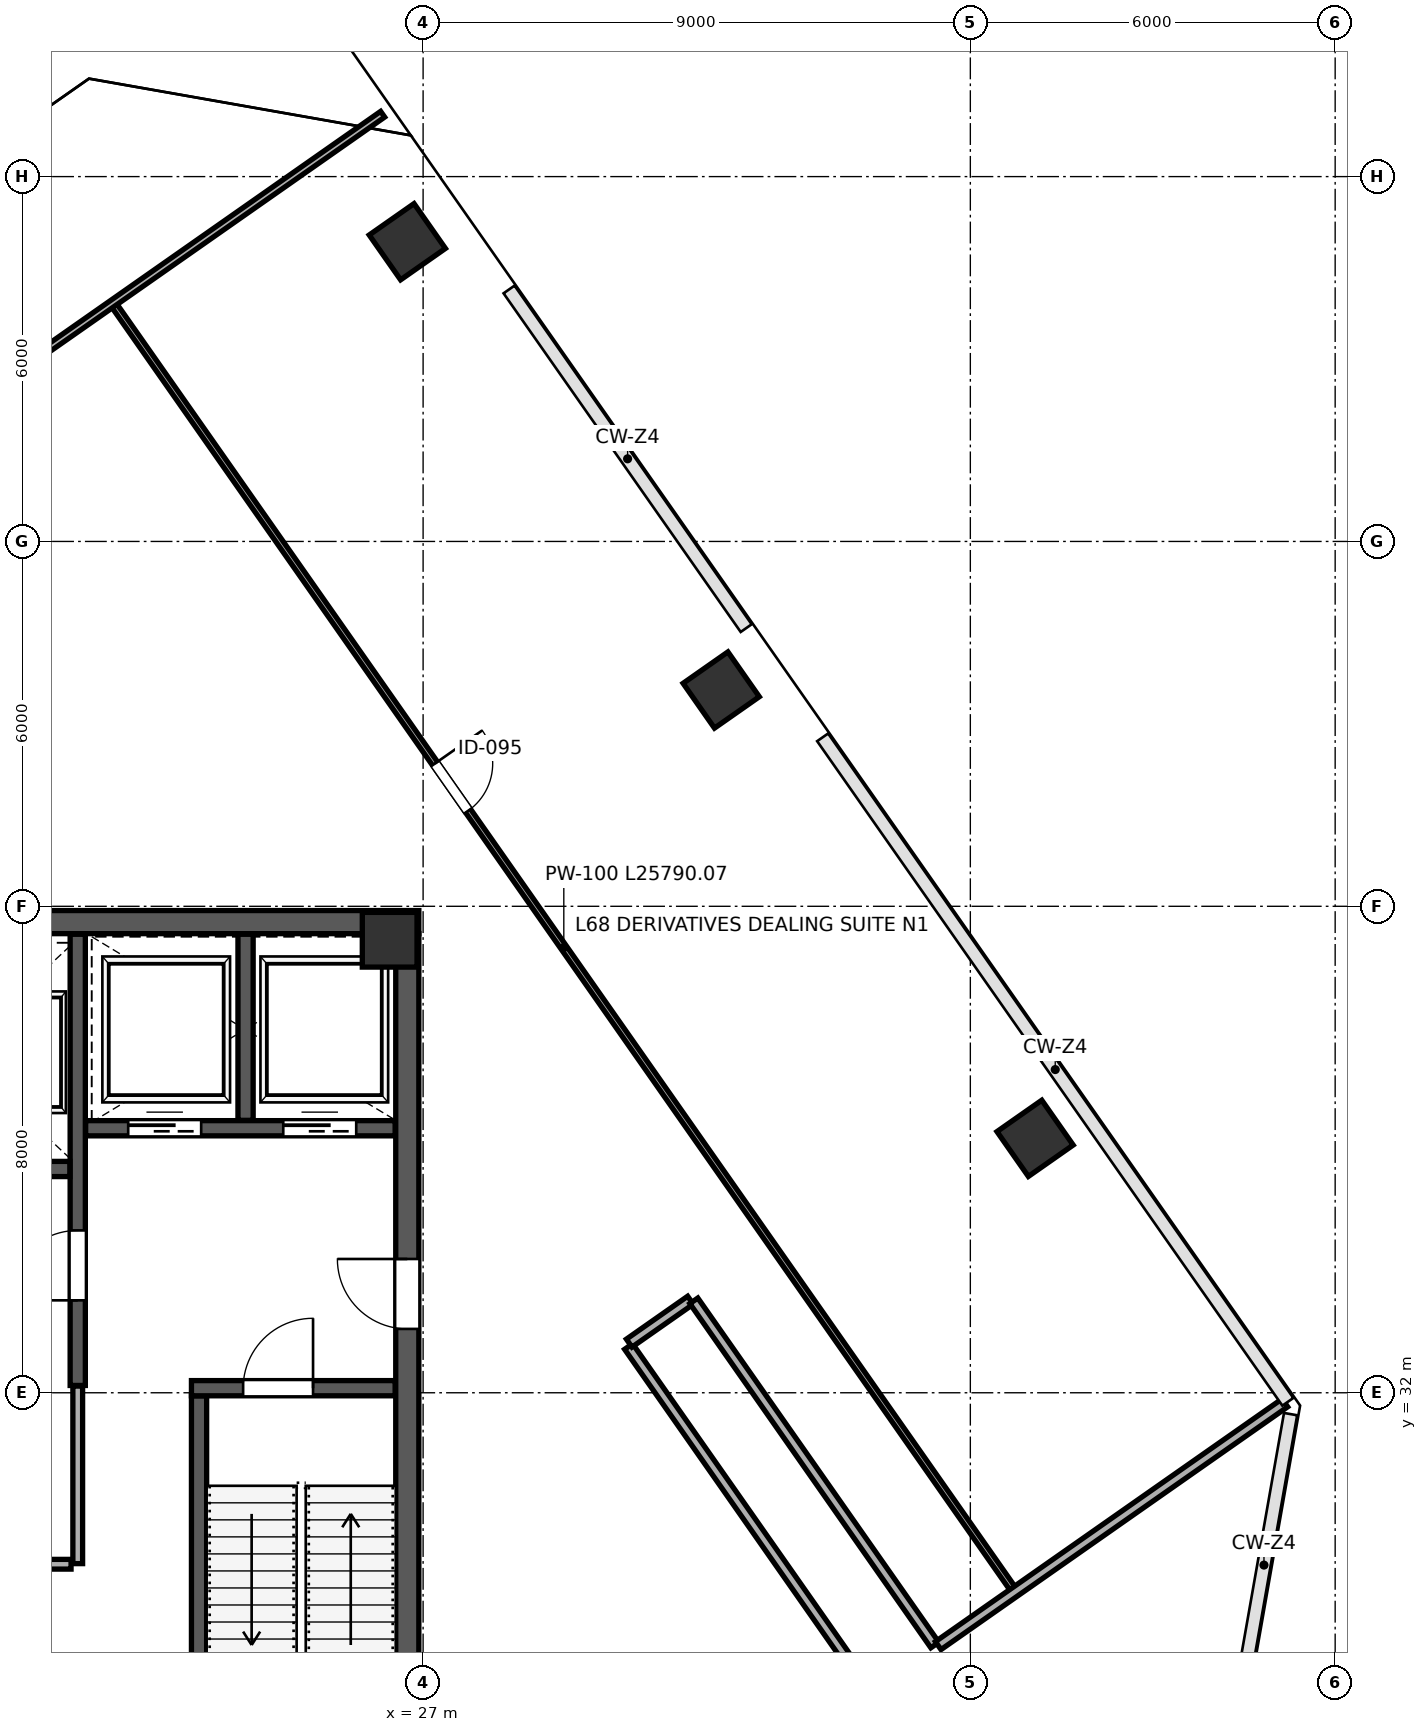
"""IFC4 building model, lengths in metres.
Left out: names, types, materials, properties, quantities, classifications, styles, units other than length and angle.
Written with IfcOpenShell. Run it as: python <this file> out.ifc"""

import sys

from ifc_helpers import new_model, si_unit, direction, frame, frame_2d, origin, origin_2d, place, context, subcontext, project, spatial, rectangle, extrude, clip, halfspace, source, transform, mapped, element, fill, save


model = new_model("IFC4")
c1 = context("Model", 3, precision=1e-05, world=origin(), true_north=direction((0.0, 1.0)))
c2 = subcontext(c1, "Body", "Model", "MODEL_VIEW")
j1 = project(units=[si_unit("LENGTHUNIT", "METRE"), si_unit("PLANEANGLEUNIT", "RADIAN")], contexts=[c1])
p1 = place(None, origin())
s1 = spatial("IfcSite", under=j1, at=p1, CompositionType="ELEMENT")
p2 = place(p1, origin())
s2 = spatial("IfcBuilding", under=s1, at=p2, CompositionType="ELEMENT")
p3 = place(p2, frame((0.0, 0.0, 303.0)))
s3 = spatial("IfcBuildingStorey", under=s2, at=p3, CompositionType="ELEMENT", Elevation=303.0)
m1 = source(origin(), c2, "Body", "SweptSolid", [
    extrude(rectangle(XDim=0.9, YDim=0.9, at=origin_2d()), origin(), (0.0, 0.0, 1.0), 4.198),
])
p4 = place(p3, frame((26.45, 39.45, 0.001), z_axis=(0.0, 0.0, 1.0), x_axis=(1.0, 0.0, 0.0)))
e1 = element("IfcColumn", 1, at=p4, inside=s3, PredefinedType="COLUMN", context=c2, shape_type="MappedRepresentation", body=[
    mapped(m1, transform((0.0, 0.0, 0.0), scale=1.0)),
])
p5 = place(p3, frame((26.74, 50.929, 0.0), z_axis=(0.191430082307, -0.057525850381, 0.979819013964), x_axis=(-0.933735019566, -0.318322018104, 0.163737613351)))
e2 = element("IfcColumn", 2, at=p5, inside=s3, PredefinedType="COLUMN", context=c2, shape_type="Clipping", body=[
    clip(clip(extrude(rectangle(XDim=0.9, YDim=0.9, at=origin_2d()), origin(), (0.0, 0.0, 1.0), 4.286), halfspace(frame((0.0, 0.0, 0.129), z_axis=(0.0, 0.0, -1.0), x_axis=(1.0, 0.0, 0.0)), False)), halfspace(frame((0.0, 0.0, 4.158), z_axis=(0.0, 0.0, 1.0), x_axis=(1.0, 0.0, 0.0)), False)),
])
p6 = place(p3, frame((31.903, 43.557, 0.0), z_axis=(0.116149103088, -0.109205406707, 0.987209990325), x_axis=(-0.982055587014, 0.136059325821, 0.130593582814)))
e3 = element("IfcColumn", 3, at=p6, inside=s3, PredefinedType="COLUMN", context=c2, shape_type="Clipping", body=[
    clip(clip(extrude(rectangle(XDim=0.9, YDim=0.9, at=origin_2d()), origin(), (0.0, 0.0, 1.0), 4.254), halfspace(frame((0.0, 0.0, 0.102), z_axis=(0.0, 0.0, -1.0), x_axis=(1.0, 0.0, 0.0)), False)), halfspace(frame((0.0, 0.0, 4.152), z_axis=(0.0, 0.0, 1.0), x_axis=(1.0, 0.0, 0.0)), False)),
])
p7 = place(p3, frame((37.065, 36.184, 0.0), z_axis=(0.039386712423, -0.160356091191, 0.986273091442), x_axis=(-0.749730751195, 0.647771912034, 0.135260307157)))
e4 = element("IfcColumn", 4, at=p7, inside=s3, PredefinedType="COLUMN", context=c2, shape_type="Clipping", body=[
    clip(clip(extrude(rectangle(XDim=0.9, YDim=0.9, at=origin_2d()), origin(), (0.0, 0.0, 1.0), 4.258), halfspace(frame((0.0, 0.0, 0.106), z_axis=(0.0, 0.0, -1.0), x_axis=(1.0, 0.0, 0.0)), False)), halfspace(frame((0.0, 0.0, 4.153), z_axis=(0.0, 0.0, 1.0), x_axis=(1.0, 0.0, 0.0)), False)),
])
p8 = place(p3, frame((26.74, 24.45, 0.0), z_axis=(0.0, 0.0, 1.0), x_axis=(0.0, 1.0, 0.0)))
e5 = element("IfcWall", 5, at=p8, inside=s3, PredefinedType="SHEAR", context=c2, shape_type="SweptSolid", body=[
    extrude(rectangle(XDim=15.1, YDim=0.38, at=frame_2d((7.55, 0.0))), origin(), (0.0, 0.0, 1.0), 3.96),
])
p9 = place(p8, frame((8.6, 0.0, 0.0)))
e6 = element("IfcOpeningElement", 6, at=p9, cuts=e5, PredefinedType="OPENING", context=c2, shape_type="SweptSolid", body=[
    extrude(rectangle(XDim=1.15, YDim=2.2, at=frame_2d((0.575, 1.1))), frame((0.0, 0.2, 0.0), z_axis=(0.0, -1.0, 0.0), x_axis=(1.0, 0.0, 0.0)), (0.0, 0.0, 1.0), 0.4),
])
p10 = place(p3, frame((9.07, 39.74, 0.0), z_axis=(0.0, 0.0, 1.0), x_axis=(1.0, 0.0, 0.0)))
e7 = element("IfcWall", 7, at=p10, inside=s3, PredefinedType="SHEAR", context=c2, shape_type="SweptSolid", body=[
    extrude(rectangle(XDim=17.86, YDim=0.38, at=frame_2d((8.93, 0.0))), origin(), (0.0, 0.0, 1.0), 3.96),
])
p11 = place(p3, frame((23.315, 24.46, 0.0), z_axis=(0.0, 0.0, 1.0), x_axis=(0.0, 1.0, 0.0)))
e8 = element("IfcWall", 8, at=p11, inside=s3, PredefinedType="SHEAR", context=c2, shape_type="SweptSolid", body=[
    extrude(rectangle(XDim=7.49, YDim=0.25, at=frame_2d((3.745, 0.0))), origin(), (0.0, 0.0, 1.0), 3.96),
])
p12 = place(p3, frame((23.19, 32.075, 0.0), z_axis=(0.0, 0.0, 1.0), x_axis=(1.0, 0.0, 0.0)))
e9 = element("IfcWall", 9, at=p12, inside=s3, PredefinedType="SHEAR", context=c2, shape_type="SweptSolid", body=[
    extrude(rectangle(XDim=3.35, YDim=0.25, at=frame_2d((1.675, 0.0))), origin(), (0.0, 0.0, 1.0), 3.96),
])
p13 = place(p12, frame((0.85, 0.0, 0.0)))
e10 = element("IfcOpeningElement", 10, at=p13, cuts=e9, PredefinedType="OPENING", context=c2, shape_type="SweptSolid", body=[
    extrude(rectangle(XDim=1.15, YDim=2.2, at=frame_2d((0.575, 1.1))), frame((0.0, 0.135, 0.0), z_axis=(0.0, -1.0, 0.0), x_axis=(1.0, 0.0, 0.0)), (0.0, 0.0, 1.0), 0.27),
])
p14 = place(p3, frame((21.32, 32.12, 0.0), z_axis=(0.0, 0.0, 1.0), x_axis=(0.0, 1.0, 0.0)))
e11 = element("IfcWall", 11, at=p14, inside=s3, PredefinedType="SHEAR", context=c2, shape_type="SweptSolid", body=[
    extrude(rectangle(XDim=7.42, YDim=0.25, at=frame_2d((3.71, 0.0))), origin(), (0.0, 0.0, 1.0), 3.96),
])
p15 = place(p14, frame((1.4, 0.0, 0.0)))
e12 = element("IfcOpeningElement", 12, at=p15, cuts=e11, PredefinedType="OPENING", context=c2, shape_type="SweptSolid", body=[
    extrude(rectangle(XDim=1.15, YDim=2.2, at=frame_2d((0.575, 1.1))), frame((0.0, 0.135, 0.0), z_axis=(0.0, -1.0, 0.0), x_axis=(1.0, 0.0, 0.0)), (0.0, 0.0, 1.0), 0.27),
])
p16 = place(p3, frame((21.45, 36.35, 0.0), z_axis=(0.0, 0.0, 1.0), x_axis=(1.0, 0.0, 0.0)))
e13 = element("IfcWall", 13, at=p16, inside=s3, PredefinedType="SHEAR", context=c2, shape_type="SweptSolid", body=[
    extrude(rectangle(XDim=5.09, YDim=0.25, at=frame_2d((2.545, 0.0))), origin(), (0.0, 0.0, 1.0), 3.96),
])
p17 = place(p16, frame((0.7, 0.0, 0.0)))
e14 = element("IfcOpeningElement", 14, at=p17, cuts=e13, PredefinedType="OPENING", context=c2, shape_type="SweptSolid", body=[
    extrude(rectangle(XDim=1.2, YDim=2.2, at=frame_2d((0.6, 1.1))), frame((0.0, 0.135, 0.0), z_axis=(0.0, -1.0, 0.0), x_axis=(1.0, 0.0, 0.0)), (0.0, 0.0, 1.0), 0.27),
])
p18 = place(p16, frame((3.25, 0.0, 0.0)))
e15 = element("IfcOpeningElement", 15, at=p18, cuts=e13, PredefinedType="OPENING", context=c2, shape_type="SweptSolid", body=[
    extrude(rectangle(XDim=1.2, YDim=2.2, at=frame_2d((0.6, 1.1))), frame((0.0, 0.135, 0.0), z_axis=(0.0, -1.0, 0.0), x_axis=(1.0, 0.0, 0.0)), (0.0, 0.0, 1.0), 0.27),
])
p19 = place(p3, frame((24.08, 36.48, 0.0), z_axis=(0.0, 0.0, 1.0), x_axis=(0.0, 1.0, 0.0)))
e16 = element("IfcWall", 16, at=p19, inside=s3, PredefinedType="SHEAR", context=c2, shape_type="SweptSolid", body=[
    extrude(rectangle(XDim=3.06, YDim=0.25, at=frame_2d((1.53, 0.0))), origin(), (0.0, 0.0, 1.0), 3.96),
])
p20 = place(p3, frame((17.32, 35.68, 0.0), z_axis=(0.0, 0.0, 1.0), x_axis=(1.0, 0.0, 0.0)))
e17 = element("IfcWall", 17, at=p20, inside=s3, PredefinedType="SHEAR", context=c2, shape_type="SweptSolid", body=[
    extrude(rectangle(XDim=3.87, YDim=0.25, at=frame_2d((1.935, 0.0))), origin(), (0.0, 0.0, 1.0), 3.96),
])
p21 = place(p20, frame((0.45, 0.0, 0.0)))
e18 = element("IfcOpeningElement", 18, at=p21, cuts=e17, PredefinedType="OPENING", context=c2, shape_type="SweptSolid", body=[
    extrude(rectangle(XDim=1.1, YDim=2.2, at=frame_2d((0.55, 1.1))), frame((0.0, 0.135, 0.0), z_axis=(0.0, -1.0, 0.0), x_axis=(1.0, 0.0, 0.0)), (0.0, 0.0, 1.0), 0.27),
])
p22 = place(p20, frame((2.35, 0.0, 0.0)))
e19 = element("IfcOpeningElement", 19, at=p22, cuts=e17, PredefinedType="OPENING", context=c2, shape_type="SweptSolid", body=[
    extrude(rectangle(XDim=1.1, YDim=2.2, at=frame_2d((0.55, 1.1))), frame((0.0, 0.135, 0.0), z_axis=(0.0, -1.0, 0.0), x_axis=(1.0, 0.0, 0.0)), (0.0, 0.0, 1.0), 0.27),
])
p23 = place(p3, frame((12.84, 29.18, 0.0), z_axis=(0.0, 0.0, 1.0), x_axis=(1.0, 0.0, 0.0)))
e20 = element("IfcWall", 20, at=p23, inside=s3, PredefinedType="PARTITIONING", context=c2, shape_type="SweptSolid", body=[
    extrude(rectangle(XDim=8.37, YDim=0.16, at=frame_2d((4.185, 0.0))), origin(), (0.0, 0.0, 1.0), 3.96),
])
p24 = place(p23, frame((0.95, 0.0, 0.0)))
e21 = element("IfcOpeningElement", 21, at=p24, cuts=e20, PredefinedType="OPENING", context=c2, shape_type="SweptSolid", body=[
    extrude(rectangle(XDim=0.85, YDim=2.1, at=frame_2d((0.425, 1.05))), frame((0.0, 0.09, 0.0), z_axis=(0.0, -1.0, 0.0), x_axis=(1.0, 0.0, 0.0)), (0.0, 0.0, 1.0), 0.18),
])
p25 = place(p23, frame((4.2, 0.0, 0.0)))
e22 = element("IfcOpeningElement", 22, at=p25, cuts=e20, PredefinedType="OPENING", context=c2, shape_type="SweptSolid", body=[
    extrude(rectangle(XDim=0.85, YDim=2.1, at=frame_2d((0.425, 1.05))), frame((0.0, 0.09, 0.0), z_axis=(0.0, -1.0, 0.0), x_axis=(1.0, 0.0, 0.0)), (0.0, 0.0, 1.0), 0.18),
])
p26 = place(p3, frame((21.32, 29.19, 0.0), z_axis=(0.0, 0.0, 1.0), x_axis=(0.0, 1.0, 0.0)))
e23 = element("IfcWall", 23, at=p26, inside=s3, PredefinedType="PARTITIONING", context=c2, shape_type="SweptSolid", body=[
    extrude(rectangle(XDim=2.92, YDim=0.16, at=frame_2d((1.46, 0.0))), origin(), (0.0, 0.0, 1.0), 3.96),
])
p27 = place(p3, frame((21.918, 49.884, 0.0), z_axis=(0.0, 0.0, 1.0), x_axis=(0.57358495776, -0.819146077468, 0.0)))
e24 = element("IfcWall", 24, at=p27, inside=s3, PredefinedType="PARTITIONING", context=c2, shape_type="SweptSolid", body=[
    extrude(rectangle(XDim=25.79, YDim=0.1, at=frame_2d((12.895, 0.0))), origin(), (0.0, 0.0, 1.0), 3.96),
])
p28 = place(p27, frame((9.2, 0.0, 0.0)))
e25 = element("IfcOpeningElement", 25, at=p28, cuts=e24, PredefinedType="OPENING", context=c2, shape_type="SweptSolid", body=[
    extrude(rectangle(XDim=0.95, YDim=2.15, at=frame_2d((0.475, 1.075))), frame((0.0, 0.06, 0.0), z_axis=(0.0, -1.0, 0.0), x_axis=(1.0, 0.0, 0.0)), (0.0, 0.0, 1.0), 0.12),
])
p29 = place(p3, frame((2.071, 36.036, 0.0), z_axis=(0.0, 0.0, 1.0), x_axis=(0.819154854942, 0.573572422302, 0.0)))
e26 = element("IfcWall", 26, at=p29, inside=s3, PredefinedType="PARTITIONING", context=c2, shape_type="SweptSolid", body=[
    extrude(rectangle(XDim=29.62, YDim=0.115, at=frame_2d((14.81, 0.0))), origin(), (0.0, 0.0, 1.0), 3.96),
])
p30 = place(p29, frame((4.2, 0.0, 0.0)))
e27 = element("IfcOpeningElement", 27, at=p30, cuts=e26, PredefinedType="OPENING", context=c2, shape_type="SweptSolid", body=[
    extrude(rectangle(XDim=0.95, YDim=2.15, at=frame_2d((0.475, 1.075))), frame((0.0, 0.067, 0.0), z_axis=(0.0, -1.0, 0.0), x_axis=(1.0, 0.0, 0.0)), (0.0, 0.0, 1.0), 0.135),
])
p31 = place(p3, frame((30.379, 32.76, 0.0), z_axis=(0.0, 0.0, 1.0), x_axis=(0.573609352737, -0.819128995002, 0.0)))
e28 = element("IfcWall", 28, at=p31, inside=s3, PredefinedType="PARTITIONING", context=c2, shape_type="SweptSolid", body=[
    extrude(rectangle(XDim=6.91, YDim=0.16, at=frame_2d((3.455, 0.0))), origin(), (0.0, 0.0, 1.0), 3.96),
])
p32 = place(p3, frame((30.389, 32.816, 0.0), z_axis=(0.0, 0.0, 1.0), x_axis=(0.819129336916, 0.573608864475, 0.0)))
e29 = element("IfcWall", 29, at=p32, inside=s3, PredefinedType="PARTITIONING", context=c2, shape_type="SweptSolid", body=[
    extrude(rectangle(XDim=1.23, YDim=0.16, at=frame_2d((0.615, 0.0))), origin(), (0.0, 0.0, 1.0), 3.96),
])
p33 = place(p3, frame((31.453, 33.512, 0.0), z_axis=(0.0, 0.0, 1.0), x_axis=(0.573585645457, -0.819145595927, 0.0)))
e30 = element("IfcWall", 30, at=p33, inside=s3, PredefinedType="PARTITIONING", context=c2, shape_type="SweptSolid", body=[
    extrude(rectangle(XDim=6.91, YDim=0.16, at=frame_2d((3.455, 0.0))), origin(), (0.0, 0.0, 1.0), 3.96),
])
p34 = place(p3, frame((35.472, 27.842, 0.0), z_axis=(0.0, 0.0, 1.0), x_axis=(0.819151164872, 0.573577692287, 0.0)))
e31 = element("IfcWall", 31, at=p34, inside=s3, PredefinedType="PARTITIONING", context=c2, shape_type="SweptSolid", body=[
    extrude(rectangle(XDim=6.96, YDim=0.16, at=frame_2d((3.48, 0.0))), origin(), (0.0, 0.0, 1.0), 3.96),
])
m2 = source(origin(), c2, "Body", "SweptSolid", [
    extrude(rectangle(XDim=1.15, YDim=2.2, at=frame_2d((0.575, 1.1))), frame((0.0, 0.025, 0.0), z_axis=(0.0, -1.0, 0.0), x_axis=(1.0, 0.0, 0.0)), (0.0, 0.0, 1.0), 0.05),
])
p35 = place(p15, origin())
e32 = element("IfcDoor", 32, at=p35, inside=s3, OperationType="SINGLE_SWING_LEFT", PredefinedType="DOOR", context=c2, shape_type="MappedRepresentation", body=[
    mapped(m2, transform((0.0, 0.0, 0.0), scale=1.0)),
])
fill(e12, e32)
m3 = source(origin(), c2, "Body", "SweptSolid", [
    extrude(rectangle(XDim=1.15, YDim=2.2, at=frame_2d((0.575, 1.1))), frame((0.0, 0.025, 0.0), z_axis=(0.0, -1.0, 0.0), x_axis=(1.0, 0.0, 0.0)), (0.0, 0.0, 1.0), 0.05),
])
p36 = place(p13, origin())
e33 = element("IfcDoor", 33, at=p36, inside=s3, OperationType="SINGLE_SWING_RIGHT", PredefinedType="DOOR", context=c2, shape_type="MappedRepresentation", body=[
    mapped(m3, transform((0.0, 0.0, 0.0), scale=1.0)),
])
fill(e10, e33)
p37 = place(p9, origin())
e34 = element("IfcDoor", 34, at=p37, inside=s3, OperationType="SINGLE_SWING_RIGHT", PredefinedType="DOOR", context=c2, shape_type="MappedRepresentation", body=[
    mapped(m2, transform((0.0, 0.0, 0.0), scale=1.0)),
])
fill(e6, e34)
m4 = source(origin(), c2, "Body", "SweptSolid", [
    extrude(rectangle(XDim=1.2, YDim=2.2, at=frame_2d((0.6, 1.1))), frame((0.0, 0.025, 0.0), z_axis=(0.0, -1.0, 0.0), x_axis=(1.0, 0.0, 0.0)), (0.0, 0.0, 1.0), 0.05),
])
p38 = place(p17, origin())
e35 = element("IfcDoor", 35, at=p38, inside=s3, OperationType="SLIDING_TO_LEFT", PredefinedType="DOOR", context=c2, shape_type="MappedRepresentation", body=[
    mapped(m4, transform((0.0, 0.0, 0.0), scale=1.0)),
])
fill(e14, e35)
p39 = place(p18, origin())
e36 = element("IfcDoor", 36, at=p39, inside=s3, OperationType="SLIDING_TO_RIGHT", PredefinedType="DOOR", context=c2, shape_type="MappedRepresentation", body=[
    mapped(m4, transform((0.0, 0.0, 0.0), scale=1.0)),
])
fill(e15, e36)
m5 = source(origin(), c2, "Body", "SweptSolid", [
    extrude(rectangle(XDim=0.95, YDim=2.15, at=frame_2d((0.475, 1.075))), frame((0.0, 0.025, 0.0), z_axis=(0.0, -1.0, 0.0), x_axis=(1.0, 0.0, 0.0)), (0.0, 0.0, 1.0), 0.05),
])
p40 = place(p28, origin())
e37 = element("IfcDoor", 37, at=p40, inside=s3, OperationType="SINGLE_SWING_LEFT", PredefinedType="DOOR", context=c2, shape_type="MappedRepresentation", body=[
    mapped(m5, transform((0.0, 0.0, 0.0), scale=1.0)),
])
fill(e25, e37)
save(model, sys.argv[1])
